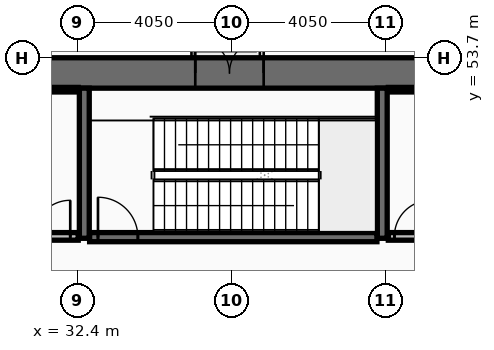
"""IFC4 building model, lengths in metres.
Left out: names, types, materials, properties, quantities, classifications, styles, units other than length and angle.
Written with IfcOpenShell. Run it as: python <this file> out.ifc"""

import sys

from ifc_helpers import new_model, si_unit, direction, frame, frame_2d, origin, place, context, subcontext, project, spatial, rectangle, extrude, element, fill, save


model = new_model("IFC4")
c1 = context("Model", 3, precision=1e-05, world=origin(), true_north=direction((0.0, 1.0)))
c2 = subcontext(c1, "Body", "Model", "MODEL_VIEW")
j1 = project(units=[si_unit("LENGTHUNIT", "METRE"), si_unit("PLANEANGLEUNIT", "RADIAN")], contexts=[c1])
p1 = place(None, origin())
s1 = spatial("IfcSite", under=j1, at=p1, CompositionType="ELEMENT")
p2 = place(p1, origin())
s2 = spatial("IfcBuilding", under=s1, at=p2, CompositionType="ELEMENT")
p3 = place(p2, origin())
s3 = spatial("IfcBuildingStorey", under=s2, at=p3, CompositionType="ELEMENT", Elevation=0.0)
p4 = place(p3, frame((16.2, 53.3, 0.0), z_axis=(0.0, 0.0, 1.0), x_axis=(1.0, 0.0, 0.0)))
e1 = element("IfcWall", 1, at=p4, inside=s3, PredefinedType="SHEAR", context=c2, shape_type="SweptSolid", body=[
    extrude(rectangle(XDim=40.5, YDim=0.8, at=frame_2d((20.25, 0.0))), origin(), (0.0, 0.0, 1.0), 5.2),
])
p5 = place(p4, frame((2.8, 0.0, 0.0)))
e2 = element("IfcOpeningElement", 2, at=p5, cuts=e1, PredefinedType="OPENING", context=c2, shape_type="SweptSolid", body=[
    extrude(rectangle(XDim=1.8, YDim=2.4, at=frame_2d((0.9, 1.2))), frame((0.0, 0.41, 0.0), z_axis=(0.0, -1.0, 0.0), x_axis=(1.0, 0.0, 0.0)), (0.0, 0.0, 1.0), 0.82),
])
p6 = place(p4, frame((19.3, 0.0, 0.0)))
e3 = element("IfcOpeningElement", 3, at=p6, cuts=e1, PredefinedType="OPENING", context=c2, shape_type="SweptSolid", body=[
    extrude(rectangle(XDim=1.8, YDim=2.4, at=frame_2d((0.9, 1.2))), frame((0.0, 0.41, 0.0), z_axis=(0.0, -1.0, 0.0), x_axis=(1.0, 0.0, 0.0)), (0.0, 0.0, 1.0), 0.82),
])
p7 = place(p4, frame((35.9, 0.0, 0.0)))
e4 = element("IfcOpeningElement", 4, at=p7, cuts=e1, PredefinedType="OPENING", context=c2, shape_type="SweptSolid", body=[
    extrude(rectangle(XDim=1.8, YDim=2.4, at=frame_2d((0.9, 1.2))), frame((0.0, 0.41, 0.0), z_axis=(0.0, -1.0, 0.0), x_axis=(1.0, 0.0, 0.0)), (0.0, 0.0, 1.0), 0.82),
])
for number, where, z_axis, x_axis in (
    (5, (32.58, 48.95, 0.0), (0.0, 0.0, 1.0), (0.0, 1.0, 0.0)),
    (6, (40.42, 48.95, 0.0), (0.0, 0.0, 1.0), (0.0, 1.0, 0.0)),
):
    element("IfcWall", number, at=place(p3, frame(where, z_axis=z_axis, x_axis=x_axis)), inside=s3, PredefinedType="SHEAR", context=c2, shape_type="SweptSolid", body=[
        extrude(rectangle(XDim=3.95, YDim=0.26, at=frame_2d((1.975, 0.0))), origin(), (0.0, 0.0, 1.0), 5.2),
    ])
p8 = place(p3, frame((32.72, 48.98, 0.0), z_axis=(0.0, 0.0, 1.0), x_axis=(1.0, 0.0, 0.0)))
e7 = element("IfcWall", 7, at=p8, inside=s3, PredefinedType="SHEAR", context=c2, shape_type="SweptSolid", body=[
    extrude(rectangle(XDim=7.56, YDim=0.24, at=frame_2d((3.78, 0.0))), origin(), (0.0, 0.0, 1.0), 5.2),
])
p9 = place(p8, frame((0.22, 0.0, 0.0)))
e8 = element("IfcOpeningElement", 8, at=p9, cuts=e7, PredefinedType="OPENING", context=c2, shape_type="SweptSolid", body=[
    extrude(rectangle(XDim=1.05, YDim=2.15, at=frame_2d((0.525, 1.075))), frame((0.0, 0.13, 0.0), z_axis=(0.0, -1.0, 0.0), x_axis=(1.0, 0.0, 0.0)), (0.0, 0.0, 1.0), 0.26),
])
p10 = place(p3, frame((24.7, 52.86, 0.0), z_axis=(0.0, 0.0, 1.0), x_axis=(1.0, 0.0, 0.0)))
e9 = element("IfcWall", 9, at=p10, inside=s3, PredefinedType="PARTITIONING", context=c2, shape_type="SweptSolid", body=[
    extrude(rectangle(XDim=7.72, YDim=0.12, at=frame_2d((3.86, 0.0))), origin(), (0.0, 0.0, 1.0), 5.2),
])
p11 = place(p3, frame((24.7, 49.0, 0.0), z_axis=(0.0, 0.0, 1.0), x_axis=(1.0, 0.0, 0.0)))
e10 = element("IfcWall", 10, at=p11, inside=s3, PredefinedType="PARTITIONING", context=c2, shape_type="SweptSolid", body=[
    extrude(rectangle(XDim=7.72, YDim=0.2, at=frame_2d((3.86, 0.0))), origin(), (0.0, 0.0, 1.0), 5.2),
])
p12 = place(p11, frame((6.56, 0.0, 0.0)))
e11 = element("IfcOpeningElement", 11, at=p12, cuts=e10, PredefinedType="OPENING", context=c2, shape_type="SweptSolid", body=[
    extrude(rectangle(XDim=0.95, YDim=2.1, at=frame_2d((0.475, 1.05))), frame((0.0, 0.11, 0.0), z_axis=(0.0, -1.0, 0.0), x_axis=(1.0, 0.0, 0.0)), (0.0, 0.0, 1.0), 0.22),
])
p13 = place(p3, frame((40.58, 52.86, 0.0), z_axis=(0.0, 0.0, 1.0), x_axis=(1.0, 0.0, 0.0)))
e12 = element("IfcWall", 12, at=p13, inside=s3, PredefinedType="PARTITIONING", context=c2, shape_type="SweptSolid", body=[
    extrude(rectangle(XDim=7.56, YDim=0.12, at=frame_2d((3.78, 0.0))), origin(), (0.0, 0.0, 1.0), 5.2),
])
p14 = place(p3, frame((40.58, 49.0, 0.0), z_axis=(0.0, 0.0, 1.0), x_axis=(1.0, 0.0, 0.0)))
e13 = element("IfcWall", 13, at=p14, inside=s3, PredefinedType="PARTITIONING", context=c2, shape_type="SweptSolid", body=[
    extrude(rectangle(XDim=7.56, YDim=0.2, at=frame_2d((3.78, 0.0))), origin(), (0.0, 0.0, 1.0), 5.2),
])
p15 = place(p14, frame((0.16, 0.0, 0.0)))
e14 = element("IfcOpeningElement", 14, at=p15, cuts=e13, PredefinedType="OPENING", context=c2, shape_type="SweptSolid", body=[
    extrude(rectangle(XDim=0.95, YDim=2.1, at=frame_2d((0.475, 1.05))), frame((0.0, 0.11, 0.0), z_axis=(0.0, -1.0, 0.0), x_axis=(1.0, 0.0, 0.0)), (0.0, 0.0, 1.0), 0.22),
])
p16 = place(p6, origin())
e15 = element("IfcDoor", 15, at=p16, inside=s3, OperationType="DOUBLE_DOOR_SINGLE_SWING", PredefinedType="DOOR", context=c2, shape_type="SweptSolid", body=[
    extrude(rectangle(XDim=1.8, YDim=2.4, at=frame_2d((0.9, 1.2))), frame((0.0, 0.025, 0.0), z_axis=(0.0, -1.0, 0.0), x_axis=(1.0, 0.0, 0.0)), (0.0, 0.0, 1.0), 0.05),
])
fill(e3, e15)
p17 = place(p9, origin())
e16 = element("IfcDoor", 16, at=p17, inside=s3, OperationType="SINGLE_SWING_LEFT", PredefinedType="DOOR", context=c2, shape_type="SweptSolid", body=[
    extrude(rectangle(XDim=1.05, YDim=2.15, at=frame_2d((0.525, 1.075))), frame((0.0, 0.025, 0.0), z_axis=(0.0, -1.0, 0.0), x_axis=(1.0, 0.0, 0.0)), (0.0, 0.0, 1.0), 0.05),
])
fill(e8, e16)
p18 = place(p12, origin())
e17 = element("IfcDoor", 17, at=p18, inside=s3, OperationType="SINGLE_SWING_RIGHT", PredefinedType="DOOR", context=c2, shape_type="SweptSolid", body=[
    extrude(rectangle(XDim=0.95, YDim=2.1, at=frame_2d((0.475, 1.05))), frame((0.0, 0.025, 0.0), z_axis=(0.0, -1.0, 0.0), x_axis=(1.0, 0.0, 0.0)), (0.0, 0.0, 1.0), 0.05),
])
fill(e11, e17)
p19 = place(p15, origin())
e18 = element("IfcDoor", 18, at=p19, inside=s3, OperationType="SINGLE_SWING_RIGHT", PredefinedType="DOOR", context=c2, shape_type="SweptSolid", body=[
    extrude(rectangle(XDim=0.95, YDim=2.1, at=frame_2d((0.475, 1.05))), frame((0.0, 0.025, 0.0), z_axis=(0.0, -1.0, 0.0), x_axis=(1.0, 0.0, 0.0)), (0.0, 0.0, 1.0), 0.05),
])
fill(e14, e18)
save(model, sys.argv[1])
